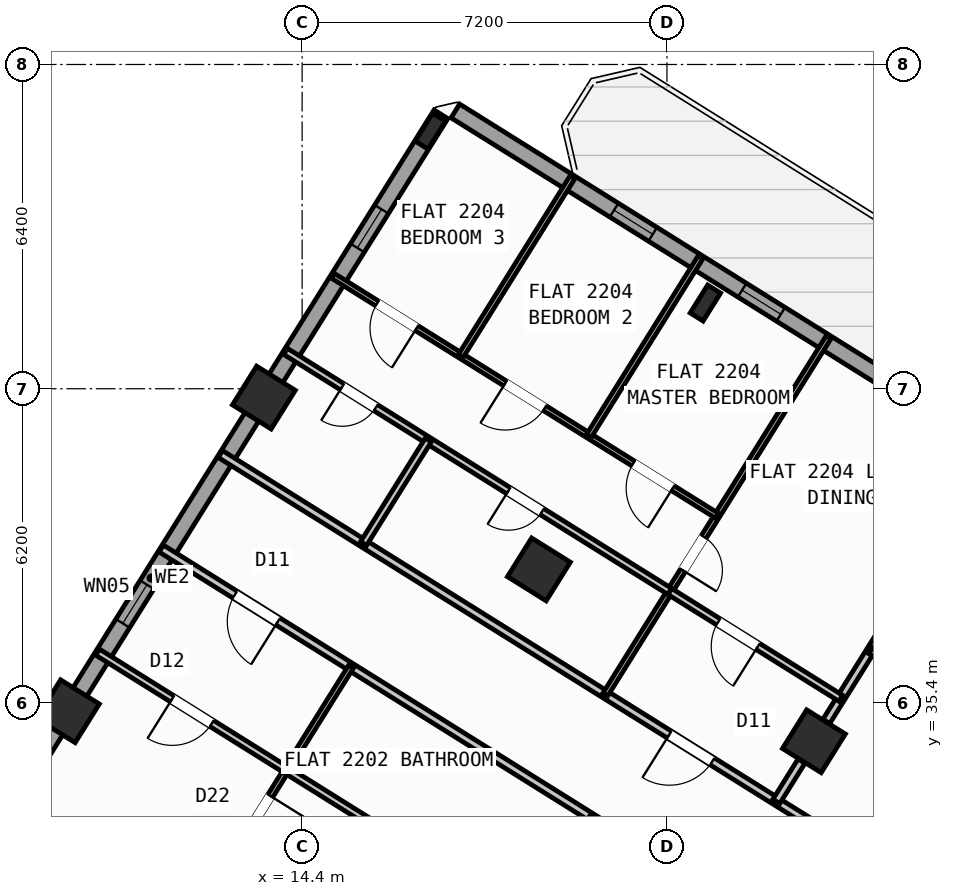
"""IFC4 building model, lengths in metres.
Left out: names, types, materials, properties, quantities, classifications, styles, units other than length and angle.
Written with IfcOpenShell. Run it as: python <this file> out.ifc"""

import sys

from ifc_helpers import new_model, si_unit, direction, frame, frame_2d, origin, origin_2d, place, context, subcontext, project, spatial, rectangle, hollow_rectangle, i_section, extrude, source, transform, mapped, element, fill, save


model = new_model("IFC4")
c1 = context("Model", 3, precision=1e-05, world=origin(), true_north=direction((0.0, 1.0)))
c2 = subcontext(c1, "Body", "Model", "MODEL_VIEW")
j1 = project(units=[si_unit("LENGTHUNIT", "METRE"), si_unit("PLANEANGLEUNIT", "RADIAN")], contexts=[c1])
p1 = place(None, origin())
s1 = spatial("IfcSite", under=j1, at=p1, CompositionType="ELEMENT")
p2 = place(p1, origin())
s2 = spatial("IfcBuilding", under=s1, at=p2, CompositionType="ELEMENT")
p3 = place(p2, frame((0.0, 0.0, 90.0)))
s3 = spatial("IfcBuildingStorey", under=s2, at=p3, CompositionType="ELEMENT", Elevation=90.0)
m1 = source(origin(), c2, "Body", "SweptSolid", [
    extrude(hollow_rectangle(XDim=0.9, YDim=0.9, WallThickness=0.036, at=origin_2d()), origin(), (0.0, 0.0, 1.0), 3.6),
])
p4 = place(p3, frame((24.5, 34.643, 0.0), z_axis=(0.0, 0.0, 1.0), x_axis=(-0.848048096156, 0.529919264233, 0.0)))
e1 = element("IfcColumn", 1, at=p4, inside=s3, PredefinedType="COLUMN", context=c2, shape_type="MappedRepresentation", body=[
    mapped(m1, transform((0.0, 0.0, 0.0), scale=1.0)),
])
m2 = source(origin(), c2, "Body", "SweptSolid", [
    extrude(i_section(OverallWidth=0.3, OverallDepth=0.65, WebThickness=0.016, FlangeThickness=0.031, at=origin_2d()), origin(), (0.0, 0.0, 1.0), 3.6),
])
p5 = place(p3, frame((22.358, 43.292, 0.0), z_axis=(0.0, 0.0, 1.0), x_axis=(-0.848048096156, 0.529919264233, 0.0)))
e2 = element("IfcColumn", 2, at=p5, inside=s3, PredefinedType="COLUMN", context=c2, shape_type="MappedRepresentation", body=[
    mapped(m2, transform((0.0, 0.0, 0.0), scale=1.0)),
])
p6 = place(p3, frame((19.073, 38.034, 0.0), z_axis=(0.0, 0.0, 1.0), x_axis=(-0.848048096156, 0.529919264233, 0.0)))
e3 = element("IfcColumn", 3, at=p6, inside=s3, PredefinedType="COLUMN", context=c2, shape_type="MappedRepresentation", body=[
    mapped(m1, transform((0.0, 0.0, 0.0), scale=1.0)),
])
p7 = place(p3, frame((16.931, 46.684, 0.0), z_axis=(0.0, 0.0, 1.0), x_axis=(-0.848048096156, 0.529919264233, 0.0)))
e4 = element("IfcColumn", 4, at=p7, inside=s3, PredefinedType="COLUMN", context=c2, shape_type="MappedRepresentation", body=[
    mapped(m2, transform((0.0, 0.0, 0.0), scale=1.0)),
])
for number, where, z_axis, x_axis in (
    (5, (13.646, 41.426, 0.0), (0.0, 0.0, 1.0), (-0.848, 0.53, 0.0)),
    (6, (9.777, 35.235, 0.0), (0.0, 0.0, 1.0), (-0.848, 0.53, 0.0)),
):
    element("IfcColumn", number, at=place(p3, frame(where, z_axis=z_axis, x_axis=x_axis)), inside=s3, PredefinedType="COLUMN", context=c2, shape_type="MappedRepresentation", body=[
        mapped(m1, transform((0.0, 0.0, 0.0), scale=1.0)),
    ])
p8 = place(p3, frame((5.7, 28.71, 0.0), z_axis=(0.0, 0.0, 1.0), x_axis=(0.529923711467, 0.8480453172, 0.0)))
e7 = element("IfcWall", 7, at=p8, inside=s3, PredefinedType="STANDARD", context=c2, shape_type="SweptSolid", body=[
    extrude(rectangle(XDim=21.587, YDim=0.32, at=frame_2d((10.794, 0.0))), origin(), (0.0, 0.0, 1.0), 2.775),
])
p9 = place(p8, frame((2.994, 0.0, 0.8)))
e8 = element("IfcOpeningElement", 8, at=p9, cuts=e7, PredefinedType="OPENING", context=c2, shape_type="SweptSolid", body=[
    extrude(rectangle(XDim=2.1, YDim=1.55, at=frame_2d((1.05, 0.775))), frame((0.0, 0.17, 0.0), z_axis=(0.0, -1.0, 0.0), x_axis=(1.0, 0.0, 0.0)), (0.0, 0.0, 1.0), 0.34),
])
p10 = place(p8, frame((9.739, 0.0, 1.0)))
e9 = element("IfcOpeningElement", 9, at=p10, cuts=e7, PredefinedType="OPENING", context=c2, shape_type="SweptSolid", body=[
    extrude(rectangle(XDim=0.9, YDim=1.25, at=frame_2d((0.45, 0.625))), frame((0.0, 0.17, 0.0), z_axis=(0.0, -1.0, 0.0), x_axis=(1.0, 0.0, 0.0)), (0.0, 0.0, 1.0), 0.34),
])
p11 = place(p8, frame((18.476, 0.0, 1.0)))
e10 = element("IfcOpeningElement", 10, at=p11, cuts=e7, PredefinedType="OPENING", context=c2, shape_type="SweptSolid", body=[
    extrude(rectangle(XDim=0.9, YDim=1.25, at=frame_2d((0.45, 0.625))), frame((0.0, 0.17, 0.0), z_axis=(0.0, -1.0, 0.0), x_axis=(1.0, 0.0, 0.0)), (0.0, 0.0, 1.0), 0.34),
])
p12 = place(p3, frame((17.424, 47.083, 0.0), z_axis=(0.0, 0.0, 1.0), x_axis=(0.848049927979, -0.529916332693, 0.0)))
e11 = element("IfcWall", 11, at=p12, inside=s3, PredefinedType="STANDARD", context=c2, shape_type="SweptSolid", body=[
    extrude(rectangle(XDim=29.223, YDim=0.32, at=frame_2d((14.612, 0.0))), origin(), (0.0, 0.0, 1.0), 3.35),
])
p13 = place(p12, frame((15.02, 0.0, 0.0)))
e12 = element("IfcOpeningElement", 12, at=p13, cuts=e11, PredefinedType="OPENING", context=c2, shape_type="SweptSolid", body=[
    extrude(rectangle(XDim=1.05, YDim=2.15, at=frame_2d((0.525, 1.075))), frame((0.0, 0.17, 0.0), z_axis=(0.0, -1.0, 0.0), x_axis=(1.0, 0.0, 0.0)), (0.0, 0.0, 1.0), 0.34),
])
p14 = place(p12, frame((20.869, 0.0, 0.8)))
e13 = element("IfcOpeningElement", 13, at=p14, cuts=e11, PredefinedType="OPENING", context=c2, shape_type="SweptSolid", body=[
    extrude(rectangle(XDim=2.1, YDim=1.55, at=frame_2d((1.05, 0.775))), frame((0.0, 0.17, 0.0), z_axis=(0.0, -1.0, 0.0), x_axis=(1.0, 0.0, 0.0)), (0.0, 0.0, 1.0), 0.34),
])
p15 = place(p12, frame((25.438, 0.0, 0.8)))
e14 = element("IfcOpeningElement", 14, at=p15, cuts=e11, PredefinedType="OPENING", context=c2, shape_type="SweptSolid", body=[
    extrude(rectangle(XDim=2.1, YDim=1.55, at=frame_2d((1.05, 0.775))), frame((0.0, 0.17, 0.0), z_axis=(0.0, -1.0, 0.0), x_axis=(1.0, 0.0, 0.0)), (0.0, 0.0, 1.0), 0.34),
])
p16 = place(p12, frame((10.481, 0.0, 1.0)))
e15 = element("IfcOpeningElement", 15, at=p16, cuts=e11, PredefinedType="OPENING", context=c2, shape_type="SweptSolid", body=[
    extrude(rectangle(XDim=0.9, YDim=1.25, at=frame_2d((0.45, 0.625))), frame((0.0, 0.17, 0.0), z_axis=(0.0, -1.0, 0.0), x_axis=(1.0, 0.0, 0.0)), (0.0, 0.0, 1.0), 0.34),
])
p17 = place(p12, frame((6.674, 0.0, 1.0)))
e16 = element("IfcOpeningElement", 16, at=p17, cuts=e11, PredefinedType="OPENING", context=c2, shape_type="SweptSolid", body=[
    extrude(rectangle(XDim=0.9, YDim=1.25, at=frame_2d((0.45, 0.625))), frame((0.0, 0.17, 0.0), z_axis=(0.0, -1.0, 0.0), x_axis=(1.0, 0.0, 0.0)), (0.0, 0.0, 1.0), 0.34),
])
p18 = place(p12, frame((3.694, 0.0, 1.0)))
e17 = element("IfcOpeningElement", 17, at=p18, cuts=e11, PredefinedType="OPENING", context=c2, shape_type="SweptSolid", body=[
    extrude(rectangle(XDim=0.9, YDim=1.25, at=frame_2d((0.45, 0.625))), frame((0.0, 0.17, 0.0), z_axis=(0.0, -1.0, 0.0), x_axis=(1.0, 0.0, 0.0)), (0.0, 0.0, 1.0), 0.34),
])
p19 = place(p3, frame((26.973, 31.447, 0.0), z_axis=(0.0, 0.0, 1.0), x_axis=(-0.848048310262, 0.529918921593, 0.0)))
e18 = element("IfcWall", 18, at=p19, inside=s3, PredefinedType="PARTITIONING", context=c2, shape_type="SweptSolid", body=[
    extrude(rectangle(XDim=16.73, YDim=0.16, at=frame_2d((8.365, 0.0))), origin(), (0.0, 0.0, 1.0), 3.34),
])
p20 = place(p19, frame((2.22, 0.0, 0.0)))
e19 = element("IfcOpeningElement", 19, at=p20, cuts=e18, PredefinedType="OPENING", context=c2, shape_type="SweptSolid", body=[
    extrude(rectangle(XDim=0.86, YDim=2.05, at=frame_2d((0.43, 1.025))), frame((0.0, 0.09, 0.0), z_axis=(0.0, -1.0, 0.0), x_axis=(1.0, 0.0, 0.0)), (0.0, 0.0, 1.0), 0.18),
])
p21 = place(p19, frame((5.28, 0.0, 0.0)))
e20 = element("IfcOpeningElement", 20, at=p21, cuts=e18, PredefinedType="OPENING", context=c2, shape_type="SweptSolid", body=[
    extrude(rectangle(XDim=1.0, YDim=2.1, at=frame_2d((0.5, 1.05))), frame((0.0, 0.09, 0.0), z_axis=(0.0, -1.0, 0.0), x_axis=(1.0, 0.0, 0.0)), (0.0, 0.0, 1.0), 0.18),
])
p22 = place(p3, frame((25.807, 29.582, 0.0), z_axis=(0.0, 0.0, 1.0), x_axis=(-0.848052408131, 0.529912363569, 0.0)))
e21 = element("IfcWall", 21, at=p22, inside=s3, PredefinedType="PARTITIONING", context=c2, shape_type="SweptSolid", body=[
    extrude(rectangle(XDim=16.73, YDim=0.16, at=frame_2d((8.365, 0.0))), origin(), (0.0, 0.0, 1.0), 3.34),
])
p23 = place(p22, frame((2.22, 0.0, 0.0)))
e22 = element("IfcOpeningElement", 22, at=p23, cuts=e21, PredefinedType="OPENING", context=c2, shape_type="SweptSolid", body=[
    extrude(rectangle(XDim=0.86, YDim=2.05, at=frame_2d((0.43, 1.025))), frame((0.0, 0.09, 0.0), z_axis=(0.0, -1.0, 0.0), x_axis=(1.0, 0.0, 0.0)), (0.0, 0.0, 1.0), 0.18),
])
p24 = place(p22, frame((14.013, 0.0, 0.0)))
e23 = element("IfcOpeningElement", 23, at=p24, cuts=e21, PredefinedType="OPENING", context=c2, shape_type="SweptSolid", body=[
    extrude(rectangle(XDim=1.0, YDim=2.1, at=frame_2d((0.5, 1.05))), frame((0.0, 0.09, 0.0), z_axis=(0.0, -1.0, 0.0), x_axis=(1.0, 0.0, 0.0)), (0.0, 0.0, 1.0), 0.18),
])
p25 = place(p3, frame((15.361, 36.108, 0.0), z_axis=(0.0, 0.0, 1.0), x_axis=(-0.529912802348, -0.848052133956, 0.0)))
e24 = element("IfcWall", 24, at=p25, inside=s3, PredefinedType="PARTITIONING", context=c2, shape_type="SweptSolid", body=[
    extrude(rectangle(XDim=11.72, YDim=0.11, at=frame_2d((5.86, 0.0))), origin(), (0.0, 0.0, 1.0), 2.995),
])
p26 = place(p25, frame((3.0, 0.0, 0.0)))
e25 = element("IfcOpeningElement", 25, at=p26, cuts=e24, PredefinedType="OPENING", context=c2, shape_type="SweptSolid", body=[
    extrude(rectangle(XDim=0.78, YDim=2.05, at=frame_2d((0.39, 1.025))), frame((0.0, 0.065, 0.0), z_axis=(0.0, -1.0, 0.0), x_axis=(1.0, 0.0, 0.0)), (0.0, 0.0, 1.0), 0.13),
])
p27 = place(p3, frame((14.09, 34.073, 0.0), z_axis=(0.0, 0.0, 1.0), x_axis=(-0.848045135007, 0.529924003034, 0.0)))
e26 = element("IfcWall", 26, at=p27, inside=s3, PredefinedType="PLUMBINGWALL", context=c2, shape_type="SweptSolid", body=[
    extrude(rectangle(XDim=4.393, YDim=0.14, at=frame_2d((2.196, 0.0))), origin(), (0.0, 0.0, 1.0), 3.34),
])
p28 = place(p27, frame((1.737, 0.0, 0.0)))
e27 = element("IfcOpeningElement", 27, at=p28, cuts=e26, PredefinedType="OPENING", context=c2, shape_type="SweptSolid", body=[
    extrude(rectangle(XDim=0.92, YDim=2.08, at=frame_2d((0.46, 1.04))), frame((0.0, 0.08, 0.0), z_axis=(0.0, -1.0, 0.0), x_axis=(1.0, 0.0, 0.0)), (0.0, 0.0, 1.0), 0.16),
])
p29 = place(p3, frame((21.321, 29.554, 0.0), z_axis=(0.0, 0.0, 1.0), x_axis=(-0.84803529765, 0.529939745575, 0.0)))
e28 = element("IfcWall", 28, at=p29, inside=s3, PredefinedType="PLUMBINGWALL", context=c2, shape_type="SweptSolid", body=[
    extrude(rectangle(XDim=8.527, YDim=0.14, at=frame_2d((4.264, 0.0))), origin(), (0.0, 0.0, 1.0), 3.34),
])
p30 = place(p29, frame((5.155, 0.0, 0.0)))
e29 = element("IfcOpeningElement", 29, at=p30, cuts=e28, PredefinedType="OPENING", context=c2, shape_type="SweptSolid", body=[
    extrude(rectangle(XDim=0.78, YDim=2.05, at=frame_2d((0.39, 1.025))), frame((0.0, 0.08, 0.0), z_axis=(0.0, -1.0, 0.0), x_axis=(1.0, 0.0, 0.0)), (0.0, 0.0, 1.0), 0.16),
])
p31 = place(p29, frame((1.011, 0.0, 0.0)))
e30 = element("IfcOpeningElement", 30, at=p31, cuts=e28, PredefinedType="OPENING", context=c2, shape_type="SweptSolid", body=[
    extrude(rectangle(XDim=0.78, YDim=2.05, at=frame_2d((0.39, 1.025))), frame((0.0, 0.08, 0.0), z_axis=(0.0, -1.0, 0.0), x_axis=(1.0, 0.0, 0.0)), (0.0, 0.0, 1.0), 0.16),
])
p32 = place(p3, frame((27.607, 39.615, 0.0), z_axis=(0.0, 0.0, 1.0), x_axis=(-0.529913610495, -0.848051628978, 0.0)))
e31 = element("IfcWall", 31, at=p32, inside=s3, PredefinedType="PARTITIONING", context=c2, shape_type="SweptSolid", body=[
    extrude(rectangle(XDim=5.401, YDim=0.16, at=frame_2d((2.7, 0.0))), origin(), (0.0, 0.0, 1.0), 2.775),
])
p33 = place(p3, frame((24.256, 34.251, 0.0), z_axis=(0.0, 0.0, 1.0), x_axis=(-0.529952145338, -0.848027548876, 0.0)))
e32 = element("IfcWall", 32, at=p33, inside=s3, PredefinedType="PARTITIONING", context=c2, shape_type="SweptSolid", body=[
    extrude(rectangle(XDim=0.938, YDim=0.16, at=frame_2d((0.469, 0.0))), origin(), (0.0, 0.0, 1.0), 2.775),
])
p34 = place(p3, frame((28.833, 34.424, 0.0), z_axis=(0.0, 0.0, 1.0), x_axis=(-0.848059820872, 0.529900500304, 0.0)))
e33 = element("IfcWall", 33, at=p34, inside=s3, PredefinedType="PLUMBINGWALL", context=c2, shape_type="SweptSolid", body=[
    extrude(rectangle(XDim=3.79, YDim=0.14, at=frame_2d((1.895, 0.0))), origin(), (0.0, 0.0, 1.0), 3.34),
])
p35 = place(p34, frame((1.99, 0.0, 0.0)))
e34 = element("IfcOpeningElement", 34, at=p35, cuts=e33, PredefinedType="OPENING", context=c2, shape_type="SweptSolid", body=[
    extrude(rectangle(XDim=0.92, YDim=2.08, at=frame_2d((0.46, 1.04))), frame((0.0, 0.08, 0.0), z_axis=(0.0, -1.0, 0.0), x_axis=(1.0, 0.0, 0.0)), (0.0, 0.0, 1.0), 0.16),
])
p36 = place(p3, frame((27.518, 35.245, 0.0), z_axis=(0.0, 0.0, 1.0), x_axis=(-0.529948921118, -0.848029563757, 0.0)))
e35 = element("IfcWall", 35, at=p36, inside=s3, PredefinedType="PLUMBINGWALL", context=c2, shape_type="SweptSolid", body=[
    extrude(rectangle(XDim=3.51, YDim=0.14, at=frame_2d((1.755, 0.0))), origin(), (0.0, 0.0, 1.0), 2.995),
])
p37 = place(p36, frame((1.365, 0.0, 0.0)))
e36 = element("IfcOpeningElement", 36, at=p37, cuts=e35, PredefinedType="OPENING", context=c2, shape_type="SweptSolid", body=[
    extrude(rectangle(XDim=0.78, YDim=2.05, at=frame_2d((0.39, 1.025))), frame((0.0, 0.08, 0.0), z_axis=(0.0, -1.0, 0.0), x_axis=(1.0, 0.0, 0.0)), (0.0, 0.0, 1.0), 0.16),
])
p38 = place(p3, frame((24.792, 42.62, 0.0), z_axis=(0.0, 0.0, 1.0), x_axis=(-0.529925083182, -0.848044460046, 0.0)))
e37 = element("IfcWall", 37, at=p38, inside=s3, PredefinedType="PARTITIONING", context=c2, shape_type="SweptSolid", body=[
    extrude(rectangle(XDim=8.32, YDim=0.11, at=frame_2d((4.16, 0.0))), origin(), (0.0, 0.0, 1.0), 3.34),
])
p39 = place(p38, frame((4.65, 0.0, 0.0)))
e38 = element("IfcOpeningElement", 38, at=p39, cuts=e37, PredefinedType="OPENING", context=c2, shape_type="SweptSolid", body=[
    extrude(rectangle(XDim=0.78, YDim=2.05, at=frame_2d((0.39, 1.025))), frame((0.0, 0.065, 0.0), z_axis=(0.0, -1.0, 0.0), x_axis=(1.0, 0.0, 0.0)), (0.0, 0.0, 1.0), 0.13),
])
p40 = place(p3, frame((25.03, 35.491, 0.0), z_axis=(0.0, 0.0, 1.0), x_axis=(-0.848070667369, 0.52988314103, 0.0)))
e39 = element("IfcWall", 39, at=p40, inside=s3, PredefinedType="PLUMBINGWALL", context=c2, shape_type="SweptSolid", body=[
    extrude(rectangle(XDim=3.98, YDim=0.14, at=frame_2d((1.99, 0.0))), origin(), (0.0, 0.0, 1.0), 3.34),
])
p41 = place(p40, frame((1.93, 0.0, 0.0)))
e40 = element("IfcOpeningElement", 40, at=p41, cuts=e39, PredefinedType="OPENING", context=c2, shape_type="SweptSolid", body=[
    extrude(rectangle(XDim=0.92, YDim=2.08, at=frame_2d((0.46, 1.04))), frame((0.0, 0.08, 0.0), z_axis=(0.0, -1.0, 0.0), x_axis=(1.0, 0.0, 0.0)), (0.0, 0.0, 1.0), 0.16),
])
p42 = place(p3, frame((21.655, 37.6, 0.0), z_axis=(0.0, 0.0, 1.0), x_axis=(-0.848044326704, 0.52992529657, 0.0)))
e41 = element("IfcWall", 41, at=p42, inside=s3, PredefinedType="PLUMBINGWALL", context=c2, shape_type="SweptSolid", body=[
    extrude(rectangle(XDim=8.94, YDim=0.14, at=frame_2d((4.47, 0.0))), origin(), (0.0, 0.0, 1.0), 3.34),
])
p43 = place(p42, frame((2.972, 0.0, 0.0)))
e42 = element("IfcOpeningElement", 42, at=p43, cuts=e41, PredefinedType="OPENING", context=c2, shape_type="SweptSolid", body=[
    extrude(rectangle(XDim=0.78, YDim=2.05, at=frame_2d((0.39, 1.025))), frame((0.0, 0.08, 0.0), z_axis=(0.0, -1.0, 0.0), x_axis=(1.0, 0.0, 0.0)), (0.0, 0.0, 1.0), 0.16),
])
p44 = place(p42, frame((6.843, 0.0, 0.0)))
e43 = element("IfcOpeningElement", 43, at=p44, cuts=e41, PredefinedType="OPENING", context=c2, shape_type="SweptSolid", body=[
    extrude(rectangle(XDim=0.78, YDim=2.05, at=frame_2d((0.39, 1.025))), frame((0.0, 0.08, 0.0), z_axis=(0.0, -1.0, 0.0), x_axis=(1.0, 0.0, 0.0)), (0.0, 0.0, 1.0), 0.16),
])
p45 = place(p3, frame((16.89, 40.589, 0.0), z_axis=(0.0, 0.0, 1.0), x_axis=(-0.52988967038, -0.848066587731, 0.0)))
e44 = element("IfcWall", 44, at=p45, inside=s3, PredefinedType="PLUMBINGWALL", context=c2, shape_type="SweptSolid", body=[
    extrude(rectangle(XDim=2.41, YDim=0.14, at=frame_2d((1.205, 0.0))), origin(), (0.0, 0.0, 1.0), 3.34),
])
p46 = place(p3, frame((22.588, 39.093, 0.0), z_axis=(0.0, 0.0, 1.0), x_axis=(-0.848044326704, 0.52992529657, 0.0)))
e45 = element("IfcWall", 45, at=p46, inside=s3, PredefinedType="PARTITIONING", context=c2, shape_type="SweptSolid", body=[
    extrude(rectangle(XDim=8.94, YDim=0.11, at=frame_2d((4.47, 0.0))), origin(), (0.0, 0.0, 1.0), 3.34),
])
p47 = place(p46, frame((1.03, 0.0, 0.0)))
e46 = element("IfcOpeningElement", 46, at=p47, cuts=e45, PredefinedType="OPENING", context=c2, shape_type="SweptSolid", body=[
    extrude(rectangle(XDim=0.92, YDim=2.08, at=frame_2d((0.46, 1.04))), frame((0.0, 0.065, 0.0), z_axis=(0.0, -1.0, 0.0), x_axis=(1.0, 0.0, 0.0)), (0.0, 0.0, 1.0), 0.13),
])
p48 = place(p46, frame((4.01, 0.0, 0.0)))
e47 = element("IfcOpeningElement", 47, at=p48, cuts=e45, PredefinedType="OPENING", context=c2, shape_type="SweptSolid", body=[
    extrude(rectangle(XDim=0.92, YDim=2.08, at=frame_2d((0.46, 1.04))), frame((0.0, 0.065, 0.0), z_axis=(0.0, -1.0, 0.0), x_axis=(1.0, 0.0, 0.0)), (0.0, 0.0, 1.0), 0.13),
])
p49 = place(p46, frame((6.99, 0.0, 0.0)))
e48 = element("IfcOpeningElement", 48, at=p49, cuts=e45, PredefinedType="OPENING", context=c2, shape_type="SweptSolid", body=[
    extrude(rectangle(XDim=0.92, YDim=2.08, at=frame_2d((0.46, 1.04))), frame((0.0, 0.065, 0.0), z_axis=(0.0, -1.0, 0.0), x_axis=(1.0, 0.0, 0.0)), (0.0, 0.0, 1.0), 0.13),
])
p50 = place(p3, frame((22.265, 44.199, 0.0), z_axis=(0.0, 0.0, 1.0), x_axis=(-0.529946186362, -0.848031272749, 0.0)))
e49 = element("IfcWall", 49, at=p50, inside=s3, PredefinedType="PARTITIONING", context=c2, shape_type="SweptSolid", body=[
    extrude(rectangle(XDim=4.16, YDim=0.11, at=frame_2d((2.08, 0.0))), origin(), (0.0, 0.0, 1.0), 3.34),
])
p51 = place(p3, frame((19.738, 45.779, 0.0), z_axis=(0.0, 0.0, 1.0), x_axis=(-0.529877605827, -0.848074125795, 0.0)))
e50 = element("IfcWall", 50, at=p51, inside=s3, PredefinedType="PARTITIONING", context=c2, shape_type="SweptSolid", body=[
    extrude(rectangle(XDim=4.16, YDim=0.11, at=frame_2d((2.08, 0.0))), origin(), (0.0, 0.0, 1.0), 3.34),
])
m3 = source(origin(), c2, "Body", "SweptSolid", [
    extrude(rectangle(XDim=0.9, YDim=1.25, at=frame_2d((0.45, 0.625))), frame((0.0, 0.03, 0.0), z_axis=(0.0, -1.0, 0.0), x_axis=(1.0, 0.0, 0.0)), (0.0, 0.0, 1.0), 0.06),
])
p52 = place(p10, origin())
e51 = element("IfcWindow", 51, at=p52, inside=s3, PartitioningType="SINGLE_PANEL", PredefinedType="WINDOW", context=c2, shape_type="MappedRepresentation", body=[
    mapped(m3, transform((0.0, 0.0, 0.0), scale=1.0)),
])
fill(e9, e51)
p53 = place(p11, origin())
e52 = element("IfcWindow", 52, at=p53, inside=s3, PartitioningType="SINGLE_PANEL", PredefinedType="WINDOW", context=c2, shape_type="MappedRepresentation", body=[
    mapped(m3, transform((0.0, 0.0, 0.0), scale=1.0)),
])
fill(e10, e52)
p54 = place(p17, origin())
e53 = element("IfcWindow", 53, at=p54, inside=s3, PartitioningType="SINGLE_PANEL", PredefinedType="WINDOW", context=c2, shape_type="MappedRepresentation", body=[
    mapped(m3, transform((0.0, 0.0, 0.0), scale=1.0)),
])
fill(e16, e53)
p55 = place(p18, origin())
e54 = element("IfcWindow", 54, at=p55, inside=s3, PartitioningType="SINGLE_PANEL", PredefinedType="WINDOW", context=c2, shape_type="MappedRepresentation", body=[
    mapped(m3, transform((0.0, 0.0, 0.0), scale=1.0)),
])
fill(e17, e54)
m4 = source(origin(), c2, "Body", "SweptSolid", [
    extrude(rectangle(XDim=1.0, YDim=2.1, at=frame_2d((0.5, 1.05))), frame((0.0, 0.025, 0.0), z_axis=(0.0, -1.0, 0.0), x_axis=(1.0, 0.0, 0.0)), (0.0, 0.0, 1.0), 0.05),
])
p56 = place(p24, origin())
e55 = element("IfcDoor", 55, at=p56, inside=s3, OperationType="SINGLE_SWING_LEFT", PredefinedType="DOOR", context=c2, shape_type="MappedRepresentation", body=[
    mapped(m4, transform((0.0, 0.0, 0.0), scale=1.0)),
])
fill(e23, e55)
m5 = source(origin(), c2, "Body", "SweptSolid", [
    extrude(rectangle(XDim=0.92, YDim=2.08, at=frame_2d((0.46, 1.04))), frame((0.0, 0.025, 0.0), z_axis=(0.0, -1.0, 0.0), x_axis=(1.0, 0.0, 0.0)), (0.0, 0.0, 1.0), 0.05),
])
p57 = place(p28, origin())
e56 = element("IfcDoor", 56, at=p57, inside=s3, OperationType="SINGLE_SWING_RIGHT", PredefinedType="DOOR", context=c2, shape_type="MappedRepresentation", body=[
    mapped(m5, transform((0.0, 0.0, 0.0), scale=1.0)),
])
fill(e27, e56)
m6 = source(origin(), c2, "Body", "SweptSolid", [
    extrude(rectangle(XDim=0.78, YDim=2.05, at=frame_2d((0.39, 1.025))), frame((0.0, 0.025, 0.0), z_axis=(0.0, -1.0, 0.0), x_axis=(1.0, 0.0, 0.0)), (0.0, 0.0, 1.0), 0.05),
])
p58 = place(p26, origin())
e57 = element("IfcDoor", 57, at=p58, inside=s3, OperationType="SINGLE_SWING_LEFT", PredefinedType="DOOR", context=c2, shape_type="MappedRepresentation", body=[
    mapped(m6, transform((0.0, 0.0, 0.0), scale=1.0)),
])
fill(e25, e57)
p59 = place(p21, origin())
e58 = element("IfcDoor", 58, at=p59, inside=s3, OperationType="SINGLE_SWING_RIGHT", PredefinedType="DOOR", context=c2, shape_type="MappedRepresentation", body=[
    mapped(m4, transform((0.0, 0.0, 0.0), scale=1.0)),
])
fill(e20, e58)
p60 = place(p41, origin())
e59 = element("IfcDoor", 59, at=p60, inside=s3, OperationType="SINGLE_SWING_LEFT", PredefinedType="DOOR", context=c2, shape_type="MappedRepresentation", body=[
    mapped(m5, transform((0.0, 0.0, 0.0), scale=1.0)),
])
fill(e40, e59)
p61 = place(p39, origin())
e60 = element("IfcDoor", 60, at=p61, inside=s3, OperationType="SINGLE_SWING_RIGHT", PredefinedType="DOOR", context=c2, shape_type="MappedRepresentation", body=[
    mapped(m6, transform((0.0, 0.0, 0.0), scale=1.0)),
])
fill(e38, e60)
p62 = place(p43, origin())
e61 = element("IfcDoor", 61, at=p62, inside=s3, OperationType="SINGLE_SWING_RIGHT", PredefinedType="DOOR", context=c2, shape_type="MappedRepresentation", body=[
    mapped(m6, transform((0.0, 0.0, 0.0), scale=1.0)),
])
fill(e42, e61)
p63 = place(p44, origin())
e62 = element("IfcDoor", 62, at=p63, inside=s3, OperationType="SINGLE_SWING_RIGHT", PredefinedType="DOOR", context=c2, shape_type="MappedRepresentation", body=[
    mapped(m6, transform((0.0, 0.0, 0.0), scale=1.0)),
])
fill(e43, e62)
p64 = place(p47, origin())
e63 = element("IfcDoor", 63, at=p64, inside=s3, OperationType="SINGLE_SWING_LEFT", PredefinedType="DOOR", context=c2, shape_type="MappedRepresentation", body=[
    mapped(m5, transform((0.0, 0.0, 0.0), scale=1.0)),
])
fill(e46, e63)
p65 = place(p48, origin())
e64 = element("IfcDoor", 64, at=p65, inside=s3, OperationType="SINGLE_SWING_RIGHT", PredefinedType="DOOR", context=c2, shape_type="MappedRepresentation", body=[
    mapped(m5, transform((0.0, 0.0, 0.0), scale=1.0)),
])
fill(e47, e64)
p66 = place(p49, origin())
e65 = element("IfcDoor", 65, at=p66, inside=s3, OperationType="SINGLE_SWING_LEFT", PredefinedType="DOOR", context=c2, shape_type="MappedRepresentation", body=[
    mapped(m5, transform((0.0, 0.0, 0.0), scale=1.0)),
])
fill(e48, e65)
save(model, sys.argv[1])
